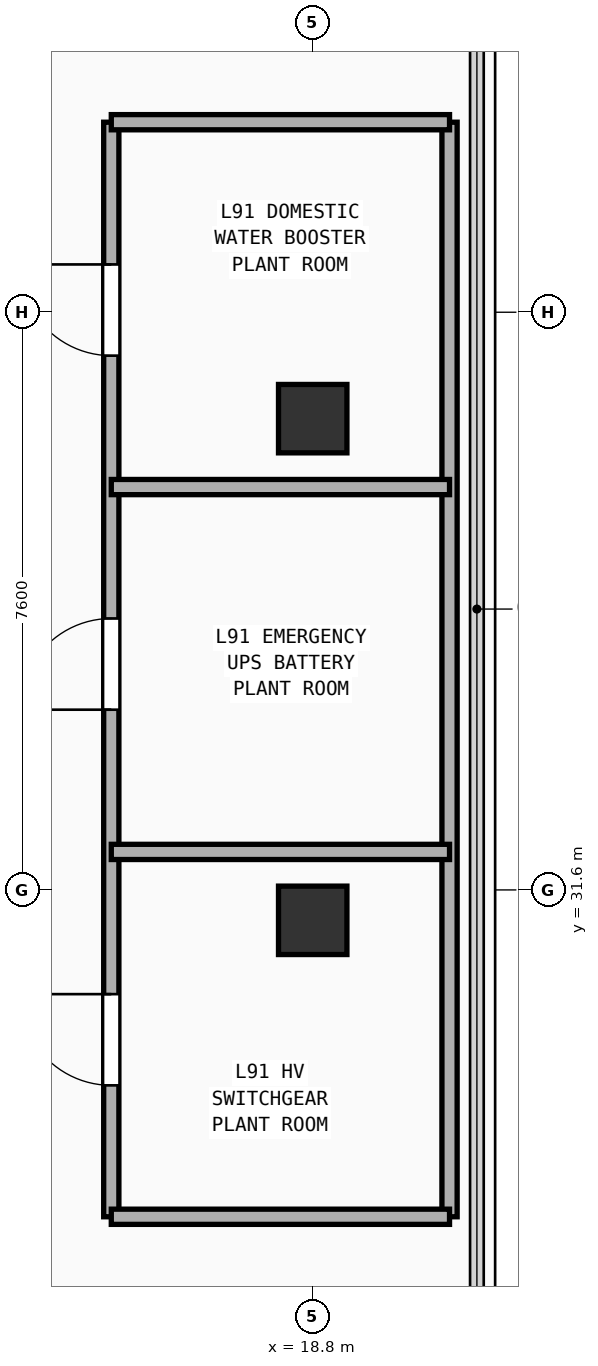
"""IFC4 building model, lengths in metres.
Left out: names, types, materials, properties, quantities, classifications, styles, units other than length and angle.
Written with IfcOpenShell. Run it as: python <this file> out.ifc"""

import sys

from ifc_helpers import new_model, si_unit, direction, frame, frame_2d, origin, origin_2d, place, context, subcontext, project, spatial, rectangle, extrude, element, fill, save


model = new_model("IFC4")
c1 = context("Model", 3, precision=1e-05, world=origin(), true_north=direction((0.0, 1.0)))
c2 = subcontext(c1, "Body", "Model", "MODEL_VIEW")
j1 = project(units=[si_unit("LENGTHUNIT", "METRE"), si_unit("PLANEANGLEUNIT", "RADIAN")], contexts=[c1])
p1 = place(None, origin())
s1 = spatial("IfcSite", under=j1, at=p1, CompositionType="ELEMENT")
p2 = place(p1, origin())
s2 = spatial("IfcBuilding", under=s1, at=p2, CompositionType="ELEMENT")
p3 = place(p2, frame((0.0, 0.0, 356.2)))
s3 = spatial("IfcBuildingStorey", under=s2, at=p3, CompositionType="ELEMENT", Elevation=356.2)
for number, where, z_axis, x_axis in (
    (1, (18.8, 31.2, 0.0), (0.0, 0.0, 1.0), (1.0, 0.0, 0.0)),
    (2, (18.8, 37.8, 0.0), (0.0, 0.0, 1.0), (1.0, 0.0, 0.0)),
):
    element("IfcColumn", number, at=place(p3, frame(where, z_axis=z_axis, x_axis=x_axis)), inside=s3, PredefinedType="COLUMN", context=c2, shape_type="SweptSolid", body=[
        extrude(rectangle(XDim=0.9, YDim=0.9, at=origin_2d()), origin(), (0.0, 0.0, 1.0), 3.82),
    ])
p4 = place(p3, frame((16.15, 27.3, 0.0), z_axis=(0.0, 0.0, 1.0), x_axis=(0.0, 1.0, 0.0)))
e3 = element("IfcWall", 3, at=p4, inside=s3, PredefinedType="PARTITIONING", context=c2, shape_type="SweptSolid", body=[
    extrude(rectangle(XDim=14.4, YDim=0.2, at=frame_2d((7.2, 0.0))), origin(), (0.0, 0.0, 1.0), 3.82),
])
p5 = place(p4, frame((1.729, 0.0, 0.0)))
e4 = element("IfcOpeningElement", 4, at=p5, cuts=e3, PredefinedType="OPENING", context=c2, shape_type="SweptSolid", body=[
    extrude(rectangle(XDim=1.2, YDim=2.25, at=frame_2d((0.6, 1.125))), frame((0.0, 0.11, 0.0), z_axis=(0.0, -1.0, 0.0), x_axis=(1.0, 0.0, 0.0)), (0.0, 0.0, 1.0), 0.22),
])
p6 = place(p4, frame((6.671, 0.0, 0.0)))
e5 = element("IfcOpeningElement", 5, at=p6, cuts=e3, PredefinedType="OPENING", context=c2, shape_type="SweptSolid", body=[
    extrude(rectangle(XDim=1.2, YDim=2.25, at=frame_2d((0.6, 1.125))), frame((0.0, 0.11, 0.0), z_axis=(0.0, -1.0, 0.0), x_axis=(1.0, 0.0, 0.0)), (0.0, 0.0, 1.0), 0.22),
])
p7 = place(p4, frame((11.329, 0.0, 0.0)))
e6 = element("IfcOpeningElement", 6, at=p7, cuts=e3, PredefinedType="OPENING", context=c2, shape_type="SweptSolid", body=[
    extrude(rectangle(XDim=1.2, YDim=2.25, at=frame_2d((0.6, 1.125))), frame((0.0, 0.11, 0.0), z_axis=(0.0, -1.0, 0.0), x_axis=(1.0, 0.0, 0.0)), (0.0, 0.0, 1.0), 0.22),
])
p8 = place(p3, frame((20.6, 27.3, 0.0), z_axis=(0.0, 0.0, 1.0), x_axis=(0.0, 1.0, 0.0)))
e7 = element("IfcWall", 7, at=p8, inside=s3, PredefinedType="PARTITIONING", context=c2, shape_type="SweptSolid", body=[
    extrude(rectangle(XDim=14.4, YDim=0.2, at=frame_2d((7.2, 0.0))), origin(), (0.0, 0.0, 1.0), 3.82),
])
for number, where, z_axis, x_axis in (
    (8, (16.15, 27.3, 0.0), (0.0, 0.0, 1.0), (1.0, 0.0, 0.0)),
    (9, (16.15, 41.7, 0.0), (0.0, 0.0, 1.0), (1.0, 0.0, 0.0)),
    (10, (16.15, 32.1, 0.0), (0.0, 0.0, 1.0), (1.0, 0.0, 0.0)),
    (11, (16.15, 36.9, 0.0), (0.0, 0.0, 1.0), (1.0, 0.0, 0.0)),
):
    element("IfcWall", number, at=place(p3, frame(where, z_axis=z_axis, x_axis=x_axis)), inside=s3, PredefinedType="PARTITIONING", context=c2, shape_type="SweptSolid", body=[
        extrude(rectangle(XDim=4.45, YDim=0.2, at=frame_2d((2.225, 0.0))), origin(), (0.0, 0.0, 1.0), 3.82),
    ])
p9 = place(p5, origin())
e12 = element("IfcDoor", 12, at=p9, inside=s3, OperationType="SINGLE_SWING_RIGHT", PredefinedType="DOOR", context=c2, shape_type="SweptSolid", body=[
    extrude(rectangle(XDim=1.2, YDim=2.25, at=frame_2d((0.6, 1.125))), frame((0.0, 0.025, 0.0), z_axis=(0.0, -1.0, 0.0), x_axis=(1.0, 0.0, 0.0)), (0.0, 0.0, 1.0), 0.05),
])
fill(e4, e12)
p10 = place(p6, origin())
e13 = element("IfcDoor", 13, at=p10, inside=s3, OperationType="SINGLE_SWING_LEFT", PredefinedType="DOOR", context=c2, shape_type="SweptSolid", body=[
    extrude(rectangle(XDim=1.2, YDim=2.25, at=frame_2d((0.6, 1.125))), frame((0.0, 0.025, 0.0), z_axis=(0.0, -1.0, 0.0), x_axis=(1.0, 0.0, 0.0)), (0.0, 0.0, 1.0), 0.05),
])
fill(e5, e13)
p11 = place(p7, origin())
e14 = element("IfcDoor", 14, at=p11, inside=s3, OperationType="SINGLE_SWING_RIGHT", PredefinedType="DOOR", context=c2, shape_type="SweptSolid", body=[
    extrude(rectangle(XDim=1.2, YDim=2.25, at=frame_2d((0.6, 1.125))), frame((0.0, 0.025, 0.0), z_axis=(0.0, -1.0, 0.0), x_axis=(1.0, 0.0, 0.0)), (0.0, 0.0, 1.0), 0.05),
])
fill(e6, e14)
save(model, sys.argv[1])
